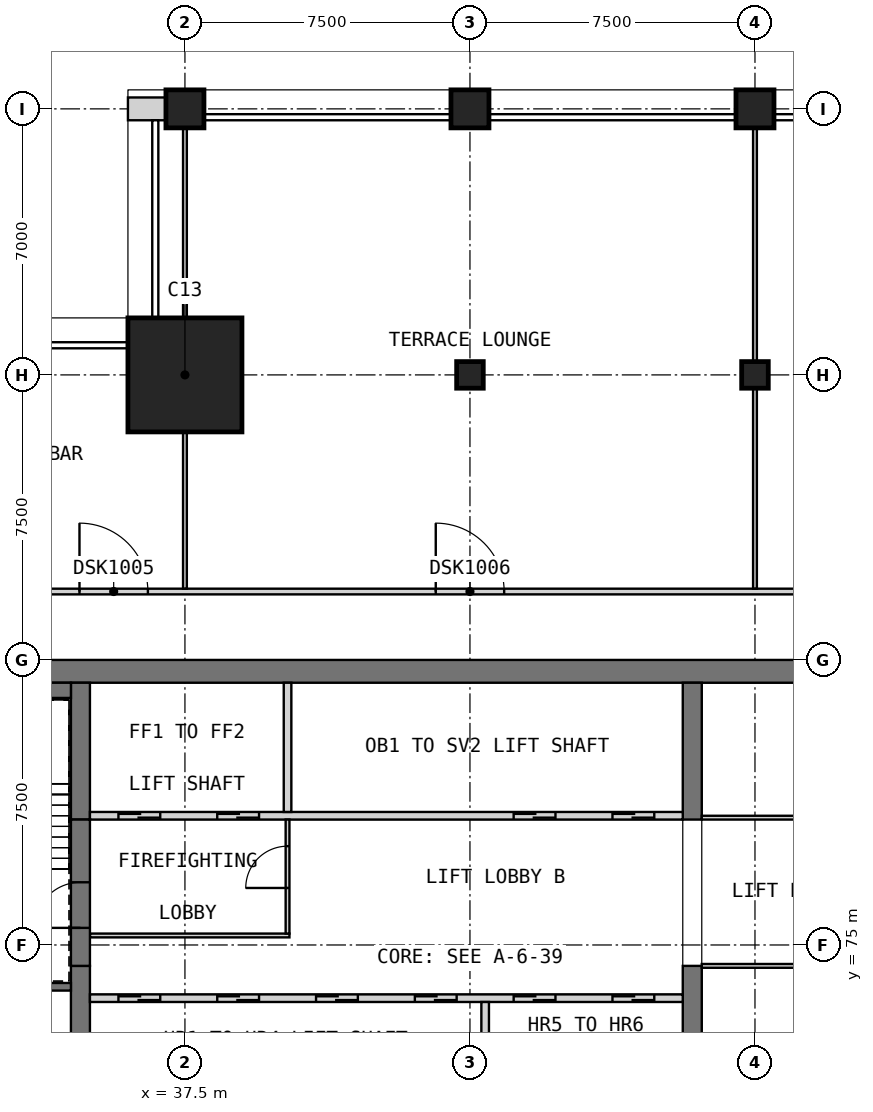
"""IFC4 building model, lengths in metres.
Left out: names, types, materials, properties, quantities, classifications, styles, units other than length and angle.
Written with IfcOpenShell. Run it as: python <this file> out.ifc"""

import sys

from ifc_helpers import new_model, si_unit, direction, frame, frame_2d, origin, origin_2d, place, context, subcontext, project, spatial, rectangle, extrude, element, fill, save


model = new_model("IFC4")
c1 = context("Model", 3, precision=1e-05, world=origin(), true_north=direction((0.0, 1.0)))
c2 = subcontext(c1, "Body", "Model", "MODEL_VIEW")
j1 = project(units=[si_unit("LENGTHUNIT", "METRE"), si_unit("PLANEANGLEUNIT", "RADIAN")], contexts=[c1])
p1 = place(None, origin())
s1 = spatial("IfcSite", under=j1, at=p1, CompositionType="ELEMENT")
p2 = place(p1, origin())
s2 = spatial("IfcBuilding", under=s1, at=p2, CompositionType="ELEMENT")
p3 = place(p2, frame((0.0, 0.0, 297.7)))
s3 = spatial("IfcBuildingStorey", under=s2, at=p3, CompositionType="ELEMENT", Elevation=297.7)
p4 = place(p3, frame((37.5, 97.0, 0.0), z_axis=(0.0, 0.0, 1.0), x_axis=(1.0, 0.0, 0.0)))
e1 = element("IfcColumn", 1, at=p4, inside=s3, PredefinedType="COLUMN", context=c2, shape_type="SweptSolid", body=[
    extrude(rectangle(XDim=1.0, YDim=1.0, at=origin_2d()), origin(), (0.0, 0.0, 1.0), 5.0),
])
p5 = place(p3, frame((45.0, 90.0, 0.0), z_axis=(0.0, 0.0, 1.0), x_axis=(1.0, 0.0, 0.0)))
e2 = element("IfcColumn", 2, at=p5, inside=s3, PredefinedType="COLUMN", context=c2, shape_type="SweptSolid", body=[
    extrude(rectangle(XDim=0.7, YDim=0.7, at=origin_2d()), origin(), (0.0, 0.0, 1.0), 5.0),
])
p6 = place(p3, frame((45.0, 97.0, 0.0), z_axis=(0.0, 0.0, 1.0), x_axis=(1.0, 0.0, 0.0)))
e3 = element("IfcColumn", 3, at=p6, inside=s3, PredefinedType="COLUMN", context=c2, shape_type="SweptSolid", body=[
    extrude(rectangle(XDim=1.0, YDim=1.0, at=origin_2d()), origin(), (0.0, 0.0, 1.0), 5.0),
])
p7 = place(p3, frame((52.5, 90.0, 0.0), z_axis=(0.0, 0.0, 1.0), x_axis=(1.0, 0.0, 0.0)))
e4 = element("IfcColumn", 4, at=p7, inside=s3, PredefinedType="COLUMN", context=c2, shape_type="SweptSolid", body=[
    extrude(rectangle(XDim=0.7, YDim=0.7, at=origin_2d()), origin(), (0.0, 0.0, 1.0), 5.0),
])
p8 = place(p3, frame((52.5, 97.0, 0.0), z_axis=(0.0, 0.0, 1.0), x_axis=(1.0, 0.0, 0.0)))
e5 = element("IfcColumn", 5, at=p8, inside=s3, PredefinedType="COLUMN", context=c2, shape_type="SweptSolid", body=[
    extrude(rectangle(XDim=1.0, YDim=1.0, at=origin_2d()), origin(), (0.0, 0.0, 1.0), 5.0),
])
p9 = place(p3, frame((37.5, 90.0, 0.0), z_axis=(0.0, 0.0, 1.0), x_axis=(1.0, 0.0, 0.0)))
e6 = element("IfcColumn", 6, at=p9, inside=s3, PredefinedType="COLUMN", context=c2, shape_type="SweptSolid", body=[
    extrude(rectangle(XDim=3.0, YDim=3.0, at=origin_2d()), origin(), (0.0, 0.0, 1.0), 5.0),
])
p10 = place(p3, frame((30.0, 82.2, 0.0), z_axis=(0.0, 0.0, 1.0), x_axis=(1.0, 0.0, 0.0)))
e7 = element("IfcWall", 7, at=p10, inside=s3, PredefinedType="SHEAR", context=c2, shape_type="SweptSolid", body=[
    extrude(rectangle(XDim=30.0, YDim=0.6, at=frame_2d((15.0, 0.0))), origin(), (0.0, 0.0, 1.0), 5.0),
])
p11 = place(p3, frame((34.75, 68.05, 0.0), z_axis=(0.0, 0.0, 1.0), x_axis=(0.0, 1.0, 0.0)))
e8 = element("IfcWall", 8, at=p11, inside=s3, PredefinedType="SHEAR", context=c2, shape_type="SweptSolid", body=[
    extrude(rectangle(XDim=6.4, YDim=0.5, at=frame_2d((3.2, 0.0))), origin(), (0.0, 0.0, 1.0), 5.0),
])
p12 = place(p3, frame((34.75, 78.3, 0.0), z_axis=(0.0, 0.0, 1.0), x_axis=(0.0, 1.0, 0.0)))
e9 = element("IfcWall", 9, at=p12, inside=s3, PredefinedType="SHEAR", context=c2, shape_type="SweptSolid", body=[
    extrude(rectangle(XDim=3.6, YDim=0.5, at=frame_2d((1.8, 0.0))), origin(), (0.0, 0.0, 1.0), 5.0),
])
p13 = place(p3, frame((50.85, 68.05, 0.0), z_axis=(0.0, 0.0, 1.0), x_axis=(0.0, 1.0, 0.0)))
e10 = element("IfcWall", 10, at=p13, inside=s3, PredefinedType="SHEAR", context=c2, shape_type="SweptSolid", body=[
    extrude(rectangle(XDim=6.4, YDim=0.5, at=frame_2d((3.2, 0.0))), origin(), (0.0, 0.0, 1.0), 5.0),
])
p14 = place(p3, frame((50.85, 78.3, 0.0), z_axis=(0.0, 0.0, 1.0), x_axis=(0.0, 1.0, 0.0)))
e11 = element("IfcWall", 11, at=p14, inside=s3, PredefinedType="SHEAR", context=c2, shape_type="SweptSolid", body=[
    extrude(rectangle(XDim=3.6, YDim=0.5, at=frame_2d((1.8, 0.0))), origin(), (0.0, 0.0, 1.0), 5.0),
])
p15 = place(p3, frame((37.0, 97.0, 0.0), z_axis=(0.0, 0.0, 1.0), x_axis=(-1.0, 0.0, 0.0)))
e12 = element("IfcWall", 12, at=p15, inside=s3, PredefinedType="SOLIDWALL", context=c2, shape_type="SweptSolid", body=[
    extrude(rectangle(XDim=1.0, YDim=0.6, at=frame_2d((0.5, 0.0))), origin(), (0.0, 0.0, 1.0), 4.7),
])
p16 = place(p3, frame((35.0, 73.6, 0.0), z_axis=(0.0, 0.0, 1.0), x_axis=(1.0, 0.0, 0.0)))
e13 = element("IfcWall", 13, at=p16, inside=s3, PredefinedType="SOLIDWALL", context=c2, shape_type="SweptSolid", body=[
    extrude(rectangle(XDim=15.6, YDim=0.2, at=frame_2d((7.8, 0.0))), origin(), (0.0, 0.0, 1.0), 5.0),
])
p17 = place(p16, frame((0.75, 0.0, 0.0)))
e14 = element("IfcOpeningElement", 14, at=p17, cuts=e13, PredefinedType="OPENING", context=c2, shape_type="SweptSolid", body=[
    extrude(rectangle(XDim=1.1, YDim=2.1, at=frame_2d((0.55, 1.05))), frame((0.0, 0.11, 0.0), z_axis=(0.0, -1.0, 0.0), x_axis=(1.0, 0.0, 0.0)), (0.0, 0.0, 1.0), 0.22),
])
p18 = place(p16, frame((3.35, 0.0, 0.0)))
e15 = element("IfcOpeningElement", 15, at=p18, cuts=e13, PredefinedType="OPENING", context=c2, shape_type="SweptSolid", body=[
    extrude(rectangle(XDim=1.1, YDim=2.1, at=frame_2d((0.55, 1.05))), frame((0.0, 0.11, 0.0), z_axis=(0.0, -1.0, 0.0), x_axis=(1.0, 0.0, 0.0)), (0.0, 0.0, 1.0), 0.22),
])
p19 = place(p16, frame((5.95, 0.0, 0.0)))
e16 = element("IfcOpeningElement", 16, at=p19, cuts=e13, PredefinedType="OPENING", context=c2, shape_type="SweptSolid", body=[
    extrude(rectangle(XDim=1.1, YDim=2.1, at=frame_2d((0.55, 1.05))), frame((0.0, 0.11, 0.0), z_axis=(0.0, -1.0, 0.0), x_axis=(1.0, 0.0, 0.0)), (0.0, 0.0, 1.0), 0.22),
])
p20 = place(p16, frame((8.55, 0.0, 0.0)))
e17 = element("IfcOpeningElement", 17, at=p20, cuts=e13, PredefinedType="OPENING", context=c2, shape_type="SweptSolid", body=[
    extrude(rectangle(XDim=1.1, YDim=2.1, at=frame_2d((0.55, 1.05))), frame((0.0, 0.11, 0.0), z_axis=(0.0, -1.0, 0.0), x_axis=(1.0, 0.0, 0.0)), (0.0, 0.0, 1.0), 0.22),
])
p21 = place(p16, frame((11.15, 0.0, 0.0)))
e18 = element("IfcOpeningElement", 18, at=p21, cuts=e13, PredefinedType="OPENING", context=c2, shape_type="SweptSolid", body=[
    extrude(rectangle(XDim=1.1, YDim=2.1, at=frame_2d((0.55, 1.05))), frame((0.0, 0.11, 0.0), z_axis=(0.0, -1.0, 0.0), x_axis=(1.0, 0.0, 0.0)), (0.0, 0.0, 1.0), 0.22),
])
p22 = place(p16, frame((13.75, 0.0, 0.0)))
e19 = element("IfcOpeningElement", 19, at=p22, cuts=e13, PredefinedType="OPENING", context=c2, shape_type="SweptSolid", body=[
    extrude(rectangle(XDim=1.1, YDim=2.1, at=frame_2d((0.55, 1.05))), frame((0.0, 0.11, 0.0), z_axis=(0.0, -1.0, 0.0), x_axis=(1.0, 0.0, 0.0)), (0.0, 0.0, 1.0), 0.22),
])
p23 = place(p3, frame((45.4, 71.5, 0.0), z_axis=(0.0, 0.0, 1.0), x_axis=(0.0, 1.0, 0.0)))
e20 = element("IfcWall", 20, at=p23, inside=s3, PredefinedType="SOLIDWALL", context=c2, shape_type="SweptSolid", body=[
    extrude(rectangle(XDim=2.0, YDim=0.2, at=frame_2d((1.0, 0.0))), origin(), (0.0, 0.0, 1.0), 5.0),
])
p24 = place(p3, frame((35.0, 78.4, 0.0), z_axis=(0.0, 0.0, 1.0), x_axis=(1.0, 0.0, 0.0)))
e21 = element("IfcWall", 21, at=p24, inside=s3, PredefinedType="SOLIDWALL", context=c2, shape_type="SweptSolid", body=[
    extrude(rectangle(XDim=15.6, YDim=0.2, at=frame_2d((7.8, 0.0))), origin(), (0.0, 0.0, 1.0), 5.0),
])
p25 = place(p24, frame((0.75, 0.0, 0.0)))
e22 = element("IfcOpeningElement", 22, at=p25, cuts=e21, PredefinedType="OPENING", context=c2, shape_type="SweptSolid", body=[
    extrude(rectangle(XDim=1.1, YDim=2.1, at=frame_2d((0.55, 1.05))), frame((0.0, 0.11, 0.0), z_axis=(0.0, -1.0, 0.0), x_axis=(1.0, 0.0, 0.0)), (0.0, 0.0, 1.0), 0.22),
])
p26 = place(p24, frame((3.35, 0.0, 0.0)))
e23 = element("IfcOpeningElement", 23, at=p26, cuts=e21, PredefinedType="OPENING", context=c2, shape_type="SweptSolid", body=[
    extrude(rectangle(XDim=1.1, YDim=2.1, at=frame_2d((0.55, 1.05))), frame((0.0, 0.11, 0.0), z_axis=(0.0, -1.0, 0.0), x_axis=(1.0, 0.0, 0.0)), (0.0, 0.0, 1.0), 0.22),
])
p27 = place(p24, frame((11.15, 0.0, 0.0)))
e24 = element("IfcOpeningElement", 24, at=p27, cuts=e21, PredefinedType="OPENING", context=c2, shape_type="SweptSolid", body=[
    extrude(rectangle(XDim=1.1, YDim=2.1, at=frame_2d((0.55, 1.05))), frame((0.0, 0.11, 0.0), z_axis=(0.0, -1.0, 0.0), x_axis=(1.0, 0.0, 0.0)), (0.0, 0.0, 1.0), 0.22),
])
p28 = place(p24, frame((13.75, 0.0, 0.0)))
e25 = element("IfcOpeningElement", 25, at=p28, cuts=e21, PredefinedType="OPENING", context=c2, shape_type="SweptSolid", body=[
    extrude(rectangle(XDim=1.1, YDim=2.1, at=frame_2d((0.55, 1.05))), frame((0.0, 0.11, 0.0), z_axis=(0.0, -1.0, 0.0), x_axis=(1.0, 0.0, 0.0)), (0.0, 0.0, 1.0), 0.22),
])
p29 = place(p3, frame((40.2, 78.5, 0.0), z_axis=(0.0, 0.0, 1.0), x_axis=(0.0, 1.0, 0.0)))
e26 = element("IfcWall", 26, at=p29, inside=s3, PredefinedType="SOLIDWALL", context=c2, shape_type="SweptSolid", body=[
    extrude(rectangle(XDim=3.4, YDim=0.2, at=frame_2d((1.7, 0.0))), origin(), (0.0, 0.0, 1.0), 5.0),
])
p30 = place(p3, frame((35.0, 75.25, 0.0), z_axis=(0.0, 0.0, 1.0), x_axis=(1.0, 0.0, 0.0)))
e27 = element("IfcWall", 27, at=p30, inside=s3, PredefinedType="PARTITIONING", context=c2, shape_type="SweptSolid", body=[
    extrude(rectangle(XDim=5.25, YDim=0.1, at=frame_2d((2.625, 0.0))), origin(), (0.0, 0.0, 1.0), 4.7),
])
p31 = place(p3, frame((40.2, 75.3, 0.0), z_axis=(0.0, 0.0, 1.0), x_axis=(0.0, 1.0, 0.0)))
e28 = element("IfcWall", 28, at=p31, inside=s3, PredefinedType="PARTITIONING", context=c2, shape_type="SweptSolid", body=[
    extrude(rectangle(XDim=3.0, YDim=0.1, at=frame_2d((1.5, 0.0))), origin(), (0.0, 0.0, 1.0), 4.7),
])
p32 = place(p31, frame((1.2, 0.0, 0.0)))
e29 = element("IfcOpeningElement", 29, at=p32, cuts=e28, PredefinedType="OPENING", context=c2, shape_type="SweptSolid", body=[
    extrude(rectangle(XDim=1.1, YDim=2.1, at=frame_2d((0.55, 1.05))), frame((0.0, 0.06, 0.0), z_axis=(0.0, -1.0, 0.0), x_axis=(1.0, 0.0, 0.0)), (0.0, 0.0, 1.0), 0.12),
])
p33 = place(p3, frame((34.75, 74.45, 0.0), z_axis=(0.0, 0.0, 1.0), x_axis=(0.0, 1.0, 0.0)))
e30 = element("IfcWall", 30, at=p33, inside=s3, PredefinedType="SOLIDWALL", context=c2, shape_type="SweptSolid", body=[
    extrude(rectangle(XDim=3.85, YDim=0.5, at=frame_2d((1.925, 0.0))), origin(), (0.0, 0.0, 1.0), 3.8),
])
p34 = place(p33, frame((1.0, 0.0, 0.0)))
e31 = element("IfcOpeningElement", 31, at=p34, cuts=e30, PredefinedType="OPENING", context=c2, shape_type="SweptSolid", body=[
    extrude(rectangle(XDim=1.2, YDim=2.1, at=frame_2d((0.6, 1.05))), frame((0.0, 0.26, 0.0), z_axis=(0.0, -1.0, 0.0), x_axis=(1.0, 0.0, 0.0)), (0.0, 0.0, 1.0), 0.52),
])
p35 = place(p3, frame((30.6, 73.9, 0.0), z_axis=(0.0, 0.0, 1.0), x_axis=(1.0, 0.0, 0.0)))
e32 = element("IfcWall", 32, at=p35, inside=s3, PredefinedType="SOLIDWALL", context=c2, shape_type="SweptSolid", body=[
    extrude(rectangle(XDim=3.9, YDim=0.2, at=frame_2d((1.95, 0.0))), origin(), (0.0, 0.0, 1.0), 4.7),
])
p36 = place(p35, frame((1.7, 0.0, 0.0)))
e33 = element("IfcOpeningElement", 33, at=p36, cuts=e32, PredefinedType="OPENING", context=c2, shape_type="SweptSolid", body=[
    extrude(rectangle(XDim=0.9, YDim=2.1, at=frame_2d((0.45, 1.05))), frame((0.0, 0.11, 0.0), z_axis=(0.0, -1.0, 0.0), x_axis=(1.0, 0.0, 0.0)), (0.0, 0.0, 1.0), 0.22),
])
p37 = place(p3, frame((31.0, 81.7, 0.0), z_axis=(0.0, 0.0, 1.0), x_axis=(1.0, 0.0, 0.0)))
e34 = element("IfcWall", 34, at=p37, inside=s3, PredefinedType="SOLIDWALL", context=c2, shape_type="SweptSolid", body=[
    extrude(rectangle(XDim=3.5, YDim=0.4, at=frame_2d((1.75, 0.0))), origin(), (0.0, 0.0, 1.0), 4.7),
])
p38 = place(p3, frame((51.1, 74.45, 0.0), z_axis=(0.0, 0.0, 1.0), x_axis=(1.0, 0.0, 0.0)))
e35 = element("IfcWall", 35, at=p38, inside=s3, PredefinedType="PARTITIONING", context=c2, shape_type="SweptSolid", body=[
    extrude(rectangle(XDim=8.3, YDim=0.1, at=frame_2d((4.15, 0.0))), origin(), (0.0, 0.0, 1.0), 4.7),
])
p39 = place(p38, frame((3.7, 0.0, 0.0)))
e36 = element("IfcOpeningElement", 36, at=p39, cuts=e35, PredefinedType="OPENING", context=c2, shape_type="SweptSolid", body=[
    extrude(rectangle(XDim=0.9, YDim=2.1, at=frame_2d((0.45, 1.05))), frame((0.0, 0.06, 0.0), z_axis=(0.0, -1.0, 0.0), x_axis=(1.0, 0.0, 0.0)), (0.0, 0.0, 1.0), 0.12),
])
p40 = place(p3, frame((51.1, 78.35, 0.0), z_axis=(0.0, 0.0, 1.0), x_axis=(1.0, 0.0, 0.0)))
e37 = element("IfcWall", 37, at=p40, inside=s3, PredefinedType="PARTITIONING", context=c2, shape_type="SweptSolid", body=[
    extrude(rectangle(XDim=8.3, YDim=0.1, at=frame_2d((4.15, 0.0))), origin(), (0.0, 0.0, 1.0), 4.7),
])
p41 = place(p40, frame((3.7, 0.0, 0.0)))
e38 = element("IfcOpeningElement", 38, at=p41, cuts=e37, PredefinedType="OPENING", context=c2, shape_type="SweptSolid", body=[
    extrude(rectangle(XDim=0.9, YDim=2.1, at=frame_2d((0.45, 1.05))), frame((0.0, 0.06, 0.0), z_axis=(0.0, -1.0, 0.0), x_axis=(1.0, 0.0, 0.0)), (0.0, 0.0, 1.0), 0.12),
])
p42 = place(p3, frame((33.75, 84.3, 0.0), z_axis=(0.0, 0.0, 1.0), x_axis=(1.0, 0.0, 0.0)))
e39 = element("IfcWall", 39, at=p42, inside=s3, PredefinedType="PARTITIONING", context=c2, shape_type="SweptSolid", body=[
    extrude(rectangle(XDim=28.05, YDim=0.15, at=frame_2d((14.025, 0.0))), origin(), (0.0, 0.0, 1.0), 4.7),
])
p43 = place(p42, frame((0.975, 0.0, 0.0)))
e40 = element("IfcOpeningElement", 40, at=p43, cuts=e39, PredefinedType="OPENING", context=c2, shape_type="SweptSolid", body=[
    extrude(rectangle(XDim=1.8, YDim=2.1, at=frame_2d((0.9, 1.05))), frame((0.0, 0.085, 0.0), z_axis=(0.0, -1.0, 0.0), x_axis=(1.0, 0.0, 0.0)), (0.0, 0.0, 1.0), 0.17),
])
p44 = place(p42, frame((10.35, 0.0, 0.0)))
e41 = element("IfcOpeningElement", 41, at=p44, cuts=e39, PredefinedType="OPENING", context=c2, shape_type="SweptSolid", body=[
    extrude(rectangle(XDim=1.8, YDim=2.1, at=frame_2d((0.9, 1.05))), frame((0.0, 0.085, 0.0), z_axis=(0.0, -1.0, 0.0), x_axis=(1.0, 0.0, 0.0)), (0.0, 0.0, 1.0), 0.17),
])
p45 = place(p42, frame((22.0, 0.0, 0.0)))
e42 = element("IfcOpeningElement", 42, at=p45, cuts=e39, PredefinedType="OPENING", context=c2, shape_type="SweptSolid", body=[
    extrude(rectangle(XDim=1.0, YDim=2.1, at=frame_2d((0.5, 1.05))), frame((0.0, 0.085, 0.0), z_axis=(0.0, -1.0, 0.0), x_axis=(1.0, 0.0, 0.0)), (0.0, 0.0, 1.0), 0.17),
])
p46 = place(p42, frame((26.65, 0.0, 0.0)))
e43 = element("IfcOpeningElement", 43, at=p46, cuts=e39, PredefinedType="OPENING", context=c2, shape_type="SweptSolid", body=[
    extrude(rectangle(XDim=1.0, YDim=2.1, at=frame_2d((0.5, 1.05))), frame((0.0, 0.085, 0.0), z_axis=(0.0, -1.0, 0.0), x_axis=(1.0, 0.0, 0.0)), (0.0, 0.0, 1.0), 0.17),
])
p47 = place(p3, frame((37.5, 84.375, 0.0), z_axis=(0.0, 0.0, 1.0), x_axis=(0.0, 1.0, 0.0)))
e44 = element("IfcWall", 44, at=p47, inside=s3, PredefinedType="PARTITIONING", context=c2, shape_type="SweptSolid", body=[
    extrude(rectangle(XDim=13.125, YDim=0.1, at=frame_2d((6.562, 0.0))), origin(), (0.0, 0.0, 1.0), 4.25),
])
p48 = place(p3, frame((52.5, 84.375, 0.0), z_axis=(0.0, 0.0, 1.0), x_axis=(0.0, 1.0, 0.0)))
e45 = element("IfcWall", 45, at=p48, inside=s3, PredefinedType="PARTITIONING", context=c2, shape_type="SweptSolid", body=[
    extrude(rectangle(XDim=13.125, YDim=0.1, at=frame_2d((6.562, 0.0))), origin(), (0.0, 0.0, 1.0), 4.7),
])
p49 = place(p17, origin())
e46 = element("IfcDoor", 46, at=p49, inside=s3, OperationType="DOUBLE_DOOR_SLIDING", PredefinedType="DOOR", context=c2, shape_type="SweptSolid", body=[
    extrude(rectangle(XDim=1.1, YDim=2.1, at=frame_2d((0.55, 1.05))), frame((0.0, 0.025, 0.0), z_axis=(0.0, -1.0, 0.0), x_axis=(1.0, 0.0, 0.0)), (0.0, 0.0, 1.0), 0.05),
])
fill(e14, e46)
p50 = place(p18, origin())
e47 = element("IfcDoor", 47, at=p50, inside=s3, OperationType="DOUBLE_DOOR_SLIDING", PredefinedType="DOOR", context=c2, shape_type="SweptSolid", body=[
    extrude(rectangle(XDim=1.1, YDim=2.1, at=frame_2d((0.55, 1.05))), frame((0.0, 0.025, 0.0), z_axis=(0.0, -1.0, 0.0), x_axis=(1.0, 0.0, 0.0)), (0.0, 0.0, 1.0), 0.05),
])
fill(e15, e47)
p51 = place(p19, origin())
e48 = element("IfcDoor", 48, at=p51, inside=s3, OperationType="DOUBLE_DOOR_SLIDING", PredefinedType="DOOR", context=c2, shape_type="SweptSolid", body=[
    extrude(rectangle(XDim=1.1, YDim=2.1, at=frame_2d((0.55, 1.05))), frame((0.0, 0.025, 0.0), z_axis=(0.0, -1.0, 0.0), x_axis=(1.0, 0.0, 0.0)), (0.0, 0.0, 1.0), 0.05),
])
fill(e16, e48)
p52 = place(p20, origin())
e49 = element("IfcDoor", 49, at=p52, inside=s3, OperationType="DOUBLE_DOOR_SLIDING", PredefinedType="DOOR", context=c2, shape_type="SweptSolid", body=[
    extrude(rectangle(XDim=1.1, YDim=2.1, at=frame_2d((0.55, 1.05))), frame((0.0, 0.025, 0.0), z_axis=(0.0, -1.0, 0.0), x_axis=(1.0, 0.0, 0.0)), (0.0, 0.0, 1.0), 0.05),
])
fill(e17, e49)
p53 = place(p21, origin())
e50 = element("IfcDoor", 50, at=p53, inside=s3, OperationType="DOUBLE_DOOR_SLIDING", PredefinedType="DOOR", context=c2, shape_type="SweptSolid", body=[
    extrude(rectangle(XDim=1.1, YDim=2.1, at=frame_2d((0.55, 1.05))), frame((0.0, 0.025, 0.0), z_axis=(0.0, -1.0, 0.0), x_axis=(1.0, 0.0, 0.0)), (0.0, 0.0, 1.0), 0.05),
])
fill(e18, e50)
p54 = place(p22, origin())
e51 = element("IfcDoor", 51, at=p54, inside=s3, OperationType="DOUBLE_DOOR_SLIDING", PredefinedType="DOOR", context=c2, shape_type="SweptSolid", body=[
    extrude(rectangle(XDim=1.1, YDim=2.1, at=frame_2d((0.55, 1.05))), frame((0.0, 0.025, 0.0), z_axis=(0.0, -1.0, 0.0), x_axis=(1.0, 0.0, 0.0)), (0.0, 0.0, 1.0), 0.05),
])
fill(e19, e51)
p55 = place(p25, origin())
e52 = element("IfcDoor", 52, at=p55, inside=s3, OperationType="DOUBLE_DOOR_SLIDING", PredefinedType="DOOR", context=c2, shape_type="SweptSolid", body=[
    extrude(rectangle(XDim=1.1, YDim=2.1, at=frame_2d((0.55, 1.05))), frame((0.0, 0.025, 0.0), z_axis=(0.0, -1.0, 0.0), x_axis=(1.0, 0.0, 0.0)), (0.0, 0.0, 1.0), 0.05),
])
fill(e22, e52)
p56 = place(p26, origin())
e53 = element("IfcDoor", 53, at=p56, inside=s3, OperationType="DOUBLE_DOOR_SLIDING", PredefinedType="DOOR", context=c2, shape_type="SweptSolid", body=[
    extrude(rectangle(XDim=1.1, YDim=2.1, at=frame_2d((0.55, 1.05))), frame((0.0, 0.025, 0.0), z_axis=(0.0, -1.0, 0.0), x_axis=(1.0, 0.0, 0.0)), (0.0, 0.0, 1.0), 0.05),
])
fill(e23, e53)
p57 = place(p27, origin())
e54 = element("IfcDoor", 54, at=p57, inside=s3, OperationType="DOUBLE_DOOR_SLIDING", PredefinedType="DOOR", context=c2, shape_type="SweptSolid", body=[
    extrude(rectangle(XDim=1.1, YDim=2.1, at=frame_2d((0.55, 1.05))), frame((0.0, 0.025, 0.0), z_axis=(0.0, -1.0, 0.0), x_axis=(1.0, 0.0, 0.0)), (0.0, 0.0, 1.0), 0.05),
])
fill(e24, e54)
p58 = place(p28, origin())
e55 = element("IfcDoor", 55, at=p58, inside=s3, OperationType="DOUBLE_DOOR_SLIDING", PredefinedType="DOOR", context=c2, shape_type="SweptSolid", body=[
    extrude(rectangle(XDim=1.1, YDim=2.1, at=frame_2d((0.55, 1.05))), frame((0.0, 0.025, 0.0), z_axis=(0.0, -1.0, 0.0), x_axis=(1.0, 0.0, 0.0)), (0.0, 0.0, 1.0), 0.05),
])
fill(e25, e55)
p59 = place(p32, origin())
e56 = element("IfcDoor", 56, at=p59, inside=s3, OperationType="SINGLE_SWING_LEFT", PredefinedType="DOOR", context=c2, shape_type="SweptSolid", body=[
    extrude(rectangle(XDim=1.1, YDim=2.1, at=frame_2d((0.55, 1.05))), frame((0.0, 0.025, 0.0), z_axis=(0.0, -1.0, 0.0), x_axis=(1.0, 0.0, 0.0)), (0.0, 0.0, 1.0), 0.05),
])
fill(e29, e56)
p60 = place(p34, origin())
e57 = element("IfcDoor", 57, at=p60, inside=s3, OperationType="SINGLE_SWING_RIGHT", PredefinedType="DOOR", context=c2, shape_type="SweptSolid", body=[
    extrude(rectangle(XDim=1.2, YDim=2.1, at=frame_2d((0.6, 1.05))), frame((0.0, 0.025, 0.0), z_axis=(0.0, -1.0, 0.0), x_axis=(1.0, 0.0, 0.0)), (0.0, 0.0, 1.0), 0.05),
])
fill(e31, e57)
p61 = place(p43, origin())
e58 = element("IfcDoor", 58, at=p61, inside=s3, OperationType="DOUBLE_DOOR_SINGLE_SWING", PredefinedType="DOOR", context=c2, shape_type="SweptSolid", body=[
    extrude(rectangle(XDim=1.8, YDim=2.1, at=frame_2d((0.9, 1.05))), frame((0.0, 0.025, 0.0), z_axis=(0.0, -1.0, 0.0), x_axis=(1.0, 0.0, 0.0)), (0.0, 0.0, 1.0), 0.05),
])
fill(e40, e58)
p62 = place(p44, origin())
e59 = element("IfcDoor", 59, at=p62, inside=s3, OperationType="DOUBLE_DOOR_SINGLE_SWING", PredefinedType="DOOR", context=c2, shape_type="SweptSolid", body=[
    extrude(rectangle(XDim=1.8, YDim=2.1, at=frame_2d((0.9, 1.05))), frame((0.0, 0.025, 0.0), z_axis=(0.0, -1.0, 0.0), x_axis=(1.0, 0.0, 0.0)), (0.0, 0.0, 1.0), 0.05),
])
fill(e41, e59)
save(model, sys.argv[1])
